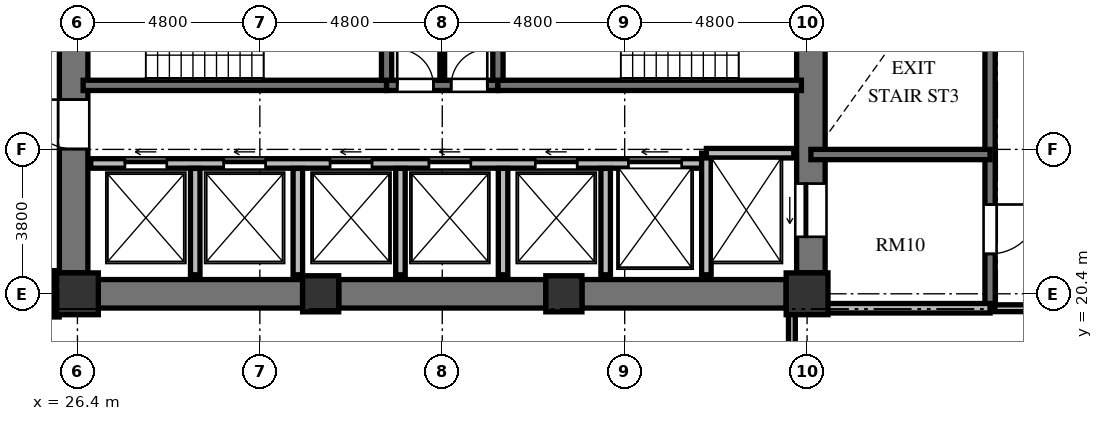
"""IFC4 building model, lengths in metres.
Left out: names, types, materials, properties, quantities, classifications, styles, units other than length and angle.
Written with IfcOpenShell. Run it as: python <this file> out.ifc"""

import sys

from ifc_helpers import new_model, si_unit, direction, frame, frame_2d, origin, origin_2d, place, context, subcontext, project, spatial, rectangle, extrude, element, fill, save


model = new_model("IFC4")
c1 = context("Model", 3, precision=1e-05, world=origin(), true_north=direction((0.0, 1.0)))
c2 = subcontext(c1, "Body", "Model", "MODEL_VIEW")
j1 = project(units=[si_unit("LENGTHUNIT", "METRE"), si_unit("PLANEANGLEUNIT", "RADIAN")], contexts=[c1])
p1 = place(None, origin())
s1 = spatial("IfcSite", under=j1, at=p1, CompositionType="ELEMENT")
p2 = place(p1, origin())
s2 = spatial("IfcBuilding", under=s1, at=p2, CompositionType="ELEMENT")
p3 = place(p2, frame((0.0, 0.0, 114.576)))
s3 = spatial("IfcBuildingStorey", under=s2, at=p3, CompositionType="ELEMENT", Elevation=114.576)
p4 = place(p3, frame((26.4, 20.4, 0.0), z_axis=(0.0, 0.0, 1.0), x_axis=(1.0, 0.0, 0.0)))
e1 = element("IfcColumn", 1, at=p4, inside=s3, PredefinedType="COLUMN", context=c2, shape_type="SweptSolid", body=[
    extrude(rectangle(XDim=1.1, YDim=1.1, at=origin_2d()), origin(), (0.0, 0.0, 1.0), 3.648),
])
for number, where, z_axis, x_axis in (
    (2, (32.8, 20.4, 0.0), (0.0, 0.0, 1.0), (1.0, 0.0, 0.0)),
    (3, (39.2, 20.4, 0.0), (0.0, 0.0, 1.0), (1.0, 0.0, 0.0)),
):
    element("IfcColumn", number, at=place(p3, frame(where, z_axis=z_axis, x_axis=x_axis)), inside=s3, PredefinedType="COLUMN", context=c2, shape_type="SweptSolid", body=[
        extrude(rectangle(XDim=0.95, YDim=0.95, at=origin_2d()), origin(), (0.0, 0.0, 1.0), 3.648),
    ])
p5 = place(p3, frame((45.6, 20.4, 0.0), z_axis=(0.0, 0.0, 1.0), x_axis=(1.0, 0.0, 0.0)))
e4 = element("IfcColumn", 4, at=p5, inside=s3, PredefinedType="COLUMN", context=c2, shape_type="SweptSolid", body=[
    extrude(rectangle(XDim=1.1, YDim=1.1, at=origin_2d()), origin(), (0.0, 0.0, 1.0), 3.648),
])
p6 = place(p3, frame((26.3, 20.95, 0.0), z_axis=(0.0, 0.0, 1.0), x_axis=(0.0, 1.0, 0.0)))
e5 = element("IfcWall", 5, at=p6, inside=s3, PredefinedType="SHEAR", context=c2, shape_type="SweptSolid", body=[
    extrude(rectangle(XDim=14.1, YDim=0.75, at=frame_2d((7.05, 0.0))), origin(), (0.0, 0.0, 1.0), 3.648),
])
p7 = place(p6, frame((6.5, 0.0, 0.0)))
e6 = element("IfcOpeningElement", 6, at=p7, cuts=e5, PredefinedType="OPENING", context=c2, shape_type="SweptSolid", body=[
    extrude(rectangle(XDim=1.2, YDim=2.15, at=frame_2d((0.6, 1.075))), frame((0.0, 0.385, 0.0), z_axis=(0.0, -1.0, 0.0), x_axis=(1.0, 0.0, 0.0)), (0.0, 0.0, 1.0), 0.77),
])
p8 = place(p6, frame((9.6, 0.0, 0.0)))
e7 = element("IfcOpeningElement", 7, at=p8, cuts=e5, PredefinedType="OPENING", context=c2, shape_type="SweptSolid", body=[
    extrude(rectangle(XDim=1.3, YDim=2.2, at=frame_2d((0.65, 1.1))), frame((0.0, 0.385, 0.0), z_axis=(0.0, -1.0, 0.0), x_axis=(1.0, 0.0, 0.0)), (0.0, 0.0, 1.0), 0.77),
])
p9 = place(p6, frame((3.26, 0.0, 0.0)))
e8 = element("IfcOpeningElement", 8, at=p9, cuts=e5, PredefinedType="OPENING", context=c2, shape_type="SweptSolid", body=[
    extrude(rectangle(XDim=1.3, YDim=2.2, at=frame_2d((0.65, 1.1))), frame((0.0, 0.385, 0.0), z_axis=(0.0, -1.0, 0.0), x_axis=(1.0, 0.0, 0.0)), (0.0, 0.0, 1.0), 0.77),
])
p10 = place(p3, frame((45.7, 20.95, 0.0), z_axis=(0.0, 0.0, 1.0), x_axis=(0.0, 1.0, 0.0)))
e9 = element("IfcWall", 9, at=p10, inside=s3, PredefinedType="SHEAR", context=c2, shape_type="SweptSolid", body=[
    extrude(rectangle(XDim=14.1, YDim=0.75, at=frame_2d((7.05, 0.0))), origin(), (0.0, 0.0, 1.0), 3.648),
])
p11 = place(p10, frame((11.75, 0.0, 0.0)))
e10 = element("IfcOpeningElement", 10, at=p11, cuts=e9, PredefinedType="OPENING", context=c2, shape_type="SweptSolid", body=[
    extrude(rectangle(XDim=1.4, YDim=2.3, at=frame_2d((0.7, 1.15))), frame((0.0, 0.385, 0.0), z_axis=(0.0, -1.0, 0.0), x_axis=(1.0, 0.0, 0.0)), (0.0, 0.0, 1.0), 0.77),
])
p12 = place(p10, frame((0.95, 0.0, 0.0)))
e11 = element("IfcOpeningElement", 11, at=p12, cuts=e9, PredefinedType="OPENING", context=c2, shape_type="SweptSolid", body=[
    extrude(rectangle(XDim=1.4, YDim=2.3, at=frame_2d((0.7, 1.15))), frame((0.0, 0.385, 0.0), z_axis=(0.0, -1.0, 0.0), x_axis=(1.0, 0.0, 0.0)), (0.0, 0.0, 1.0), 0.77),
])
p13 = place(p3, frame((26.95, 20.4, 0.0), z_axis=(0.0, 0.0, 1.0), x_axis=(1.0, 0.0, 0.0)))
e12 = element("IfcWall", 12, at=p13, inside=s3, PredefinedType="SHEAR", context=c2, shape_type="SweptSolid", body=[
    extrude(rectangle(XDim=5.375, YDim=0.75, at=frame_2d((2.688, 0.0))), origin(), (0.0, 0.0, 1.0), 3.648),
])
p14 = place(p3, frame((33.275, 20.4, 0.0), z_axis=(0.0, 0.0, 1.0), x_axis=(1.0, 0.0, 0.0)))
e13 = element("IfcWall", 13, at=p14, inside=s3, PredefinedType="SHEAR", context=c2, shape_type="SweptSolid", body=[
    extrude(rectangle(XDim=5.45, YDim=0.75, at=frame_2d((2.725, 0.0))), origin(), (0.0, 0.0, 1.0), 3.648),
])
p15 = place(p3, frame((39.675, 20.4, 0.0), z_axis=(0.0, 0.0, 1.0), x_axis=(1.0, 0.0, 0.0)))
e14 = element("IfcWall", 14, at=p15, inside=s3, PredefinedType="SHEAR", context=c2, shape_type="SweptSolid", body=[
    extrude(rectangle(XDim=5.375, YDim=0.75, at=frame_2d((2.688, 0.0))), origin(), (0.0, 0.0, 1.0), 3.648),
])
p16 = place(p3, frame((26.55, 25.885, 0.0), z_axis=(0.0, 0.0, 1.0), x_axis=(1.0, 0.0, 0.0)))
e15 = element("IfcWall", 15, at=p16, inside=s3, PredefinedType="SHEAR", context=c2, shape_type="SweptSolid", body=[
    extrude(rectangle(XDim=7.985, YDim=0.27, at=frame_2d((3.992, 0.0))), origin(), (0.0, 0.0, 1.0), 3.648),
])
p17 = place(p3, frame((34.535, 25.885, 0.0), z_axis=(0.0, 0.0, 1.0), x_axis=(1.0, 0.0, 0.0)))
e16 = element("IfcWall", 16, at=p17, inside=s3, PredefinedType="SHEAR", context=c2, shape_type="SweptSolid", body=[
    extrude(rectangle(XDim=2.93, YDim=0.27, at=frame_2d((1.465, 0.0))), origin(), (0.0, 0.0, 1.0), 3.648),
])
p18 = place(p17, frame((0.28, 0.0, 0.0)))
e17 = element("IfcOpeningElement", 17, at=p18, cuts=e16, PredefinedType="OPENING", context=c2, shape_type="SweptSolid", body=[
    extrude(rectangle(XDim=0.95, YDim=2.1, at=frame_2d((0.475, 1.05))), frame((0.0, 0.145, 0.0), z_axis=(0.0, -1.0, 0.0), x_axis=(1.0, 0.0, 0.0)), (0.0, 0.0, 1.0), 0.29),
])
p19 = place(p17, frame((1.7, 0.0, 0.0)))
e18 = element("IfcOpeningElement", 18, at=p19, cuts=e16, PredefinedType="OPENING", context=c2, shape_type="SweptSolid", body=[
    extrude(rectangle(XDim=0.95, YDim=2.1, at=frame_2d((0.475, 1.05))), frame((0.0, 0.145, 0.0), z_axis=(0.0, -1.0, 0.0), x_axis=(1.0, 0.0, 0.0)), (0.0, 0.0, 1.0), 0.29),
])
p20 = place(p3, frame((37.465, 25.885, 0.0), z_axis=(0.0, 0.0, 1.0), x_axis=(1.0, 0.0, 0.0)))
e19 = element("IfcWall", 19, at=p20, inside=s3, PredefinedType="SHEAR", context=c2, shape_type="SweptSolid", body=[
    extrude(rectangle(XDim=7.985, YDim=0.27, at=frame_2d((3.992, 0.0))), origin(), (0.0, 0.0, 1.0), 3.648),
])
for number, where, z_axis, x_axis in (
    (20, (34.535, 26.02, 0.0), (0.0, 0.0, 1.0), (0.0, 1.0, 0.0)),
    (21, (37.465, 26.02, 0.0), (0.0, 0.0, 1.0), (0.0, 1.0, 0.0)),
):
    element("IfcWall", number, at=place(p3, frame(where, z_axis=z_axis, x_axis=x_axis)), inside=s3, PredefinedType="SHEAR", context=c2, shape_type="SweptSolid", body=[
        extrude(rectangle(XDim=4.08, YDim=0.27, at=frame_2d((2.04, 0.0))), origin(), (0.0, 0.0, 1.0), 3.648),
    ])
p21 = place(p3, frame((36.0, 26.02, 0.0), z_axis=(0.0, 0.0, 1.0), x_axis=(0.0, 1.0, 0.0)))
e22 = element("IfcWall", 22, at=p21, inside=s3, PredefinedType="PARTITIONING", context=c2, shape_type="SweptSolid", body=[
    extrude(rectangle(XDim=4.08, YDim=0.125, at=frame_2d((2.04, 0.0))), origin(), (0.0, 0.0, 1.0), 3.428),
])
p22 = place(p3, frame((26.75, 23.83, 0.0), z_axis=(0.0, 0.0, 1.0), x_axis=(1.0, 0.0, 0.0)))
e23 = element("IfcWall", 23, at=p22, inside=s3, PredefinedType="SOLIDWALL", context=c2, shape_type="SweptSolid", body=[
    extrude(rectangle(XDim=16.2, YDim=0.25, at=frame_2d((8.1, 0.0))), origin(), (0.0, 0.0, 1.0), 3.428),
])
p23 = place(p22, frame((0.9, 0.0, 0.0)))
e24 = element("IfcOpeningElement", 24, at=p23, cuts=e23, PredefinedType="OPENING", context=c2, shape_type="SweptSolid", body=[
    extrude(rectangle(XDim=1.1, YDim=2.2, at=frame_2d((0.55, 1.1))), frame((0.0, 0.135, 0.0), z_axis=(0.0, -1.0, 0.0), x_axis=(1.0, 0.0, 0.0)), (0.0, 0.0, 1.0), 0.27),
])
p24 = place(p22, frame((3.5, 0.0, 0.0)))
e25 = element("IfcOpeningElement", 25, at=p24, cuts=e23, PredefinedType="OPENING", context=c2, shape_type="SweptSolid", body=[
    extrude(rectangle(XDim=1.1, YDim=2.2, at=frame_2d((0.55, 1.1))), frame((0.0, 0.135, 0.0), z_axis=(0.0, -1.0, 0.0), x_axis=(1.0, 0.0, 0.0)), (0.0, 0.0, 1.0), 0.27),
])
p25 = place(p22, frame((6.3, 0.0, 0.0)))
e26 = element("IfcOpeningElement", 26, at=p25, cuts=e23, PredefinedType="OPENING", context=c2, shape_type="SweptSolid", body=[
    extrude(rectangle(XDim=1.1, YDim=2.2, at=frame_2d((0.55, 1.1))), frame((0.0, 0.135, 0.0), z_axis=(0.0, -1.0, 0.0), x_axis=(1.0, 0.0, 0.0)), (0.0, 0.0, 1.0), 0.27),
])
p26 = place(p22, frame((8.9, 0.0, 0.0)))
e27 = element("IfcOpeningElement", 27, at=p26, cuts=e23, PredefinedType="OPENING", context=c2, shape_type="SweptSolid", body=[
    extrude(rectangle(XDim=1.1, YDim=2.2, at=frame_2d((0.55, 1.1))), frame((0.0, 0.135, 0.0), z_axis=(0.0, -1.0, 0.0), x_axis=(1.0, 0.0, 0.0)), (0.0, 0.0, 1.0), 0.27),
])
p27 = place(p22, frame((11.7, 0.0, 0.0)))
e28 = element("IfcOpeningElement", 28, at=p27, cuts=e23, PredefinedType="OPENING", context=c2, shape_type="SweptSolid", body=[
    extrude(rectangle(XDim=1.1, YDim=2.2, at=frame_2d((0.55, 1.1))), frame((0.0, 0.135, 0.0), z_axis=(0.0, -1.0, 0.0), x_axis=(1.0, 0.0, 0.0)), (0.0, 0.0, 1.0), 0.27),
])
p28 = place(p22, frame((14.15, 0.0, 0.0)))
e29 = element("IfcOpeningElement", 29, at=p28, cuts=e23, PredefinedType="OPENING", context=c2, shape_type="SweptSolid", body=[
    extrude(rectangle(XDim=1.4, YDim=2.3, at=frame_2d((0.7, 1.15))), frame((0.0, 0.135, 0.0), z_axis=(0.0, -1.0, 0.0), x_axis=(1.0, 0.0, 0.0)), (0.0, 0.0, 1.0), 0.27),
])
p29 = place(p3, frame((42.95, 20.9, 0.0), z_axis=(0.0, 0.0, 1.0), x_axis=(0.0, 1.0, 0.0)))
e30 = element("IfcWall", 30, at=p29, inside=s3, PredefinedType="SOLIDWALL", context=c2, shape_type="SweptSolid", body=[
    extrude(rectangle(XDim=3.2, YDim=0.25, at=frame_2d((1.6, 0.0))), origin(), (0.0, 0.0, 1.0), 3.428),
])
p30 = place(p3, frame((42.95, 24.1, 0.0), z_axis=(0.0, 0.0, 1.0), x_axis=(1.0, 0.0, 0.0)))
e31 = element("IfcWall", 31, at=p30, inside=s3, PredefinedType="SOLIDWALL", context=c2, shape_type="SweptSolid", body=[
    extrude(rectangle(XDim=2.3, YDim=0.25, at=frame_2d((1.15, 0.0))), origin(), (0.0, 0.0, 1.0), 3.428),
])
for number, where, z_axis, x_axis in (
    (32, (29.5, 20.9, 0.0), (0.0, 0.0, 1.0), (0.0, 1.0, 0.0)),
    (33, (32.2, 20.9, 0.0), (0.0, 0.0, 1.0), (0.0, 1.0, 0.0)),
    (34, (34.9, 20.9, 0.0), (0.0, 0.0, 1.0), (0.0, 1.0, 0.0)),
    (35, (37.6, 20.9, 0.0), (0.0, 0.0, 1.0), (0.0, 1.0, 0.0)),
    (36, (40.3, 20.9, 0.0), (0.0, 0.0, 1.0), (0.0, 1.0, 0.0)),
):
    element("IfcWall", number, at=place(p3, frame(where, z_axis=z_axis, x_axis=x_axis)), inside=s3, PredefinedType="SOLIDWALL", context=c2, shape_type="SweptSolid", body=[
        extrude(rectangle(XDim=2.8, YDim=0.25, at=frame_2d((1.4, 0.0))), origin(), (0.0, 0.0, 1.0), 3.428),
    ])
p31 = place(p3, frame((50.415, 35.845, 0.0), z_axis=(0.0, 0.0, 1.0), x_axis=(0.0, -1.0, 0.0)))
e37 = element("IfcWall", 37, at=p31, inside=s3, PredefinedType="SHEAR", context=c2, shape_type="SweptSolid", body=[
    extrude(rectangle(XDim=15.825, YDim=0.27, at=frame_2d((7.913, 0.0))), origin(), (0.0, 0.0, 1.0), 3.648),
])
p32 = place(p31, frame((4.445, 0.0, 0.0)))
e38 = element("IfcOpeningElement", 38, at=p32, cuts=e37, PredefinedType="OPENING", context=c2, shape_type="SweptSolid", body=[
    extrude(rectangle(XDim=1.2, YDim=2.15, at=frame_2d((0.6, 1.075))), frame((0.0, 0.145, 0.0), z_axis=(0.0, -1.0, 0.0), x_axis=(1.0, 0.0, 0.0)), (0.0, 0.0, 1.0), 0.29),
])
p33 = place(p31, frame((1.295, 0.0, 0.0)))
e39 = element("IfcOpeningElement", 39, at=p33, cuts=e37, PredefinedType="OPENING", context=c2, shape_type="SweptSolid", body=[
    extrude(rectangle(XDim=1.3, YDim=2.2, at=frame_2d((0.65, 1.1))), frame((0.0, 0.145, 0.0), z_axis=(0.0, -1.0, 0.0), x_axis=(1.0, 0.0, 0.0)), (0.0, 0.0, 1.0), 0.29),
])
p34 = place(p31, frame((13.095, 0.0, 0.0)))
e40 = element("IfcOpeningElement", 40, at=p34, cuts=e37, PredefinedType="OPENING", context=c2, shape_type="SweptSolid", body=[
    extrude(rectangle(XDim=1.3, YDim=2.2, at=frame_2d((0.65, 1.1))), frame((0.0, 0.145, 0.0), z_axis=(0.0, -1.0, 0.0), x_axis=(1.0, 0.0, 0.0)), (0.0, 0.0, 1.0), 0.29),
])
p35 = place(p3, frame((45.7, 24.065, 0.0), z_axis=(0.0, 0.0, 1.0), x_axis=(1.0, 0.0, 0.0)))
e41 = element("IfcWall", 41, at=p35, inside=s3, PredefinedType="SHEAR", context=c2, shape_type="SweptSolid", body=[
    extrude(rectangle(XDim=4.715, YDim=0.27, at=frame_2d((2.357, 0.0))), origin(), (0.0, 0.0, 1.0), 3.648),
])
p36 = place(p3, frame((45.7, 20.02, 0.0), z_axis=(0.0, 0.0, 1.0), x_axis=(1.0, 0.0, 0.0)))
e42 = element("IfcWall", 42, at=p36, inside=s3, PredefinedType="SOLIDWALL", context=c2, shape_type="SweptSolid", body=[
    extrude(rectangle(XDim=4.715, YDim=0.25, at=frame_2d((2.357, 0.0))), origin(), (0.0, 0.0, 1.0), 3.428),
])
p37 = place(p3, frame((53.19, 20.02, 0.0), z_axis=(0.0, 0.0, 1.0), x_axis=(-1.0, 0.0, 0.0)))
e43 = element("IfcWall", 43, at=p37, inside=s3, PredefinedType="PARTITIONING", context=c2, shape_type="SweptSolid", body=[
    extrude(rectangle(XDim=2.65, YDim=0.18, at=frame_2d((1.325, 0.0))), origin(), (0.0, 0.0, 1.0), 3.428),
])
p38 = place(p3, frame((25.83, 21.01, 0.0), z_axis=(0.0, 0.0, 1.0), x_axis=(0.0, -1.0, 0.0)))
e44 = element("IfcWall", 44, at=p38, inside=s3, PredefinedType="PARTITIONING", context=c2, shape_type="SweptSolid", body=[
    extrude(rectangle(XDim=1.22, YDim=0.18, at=frame_2d((0.61, 0.0))), origin(), (0.0, 0.0, 1.0), 3.428),
])
p39 = place(p3, frame((45.2, 19.91, 0.0), z_axis=(0.0, 0.0, 1.0), x_axis=(0.0, -1.0, 0.0)))
e45 = element("IfcWall", 45, at=p39, inside=s3, PredefinedType="PARTITIONING", context=c2, shape_type="SweptSolid", body=[
    extrude(rectangle(XDim=2.55, YDim=0.18, at=frame_2d((1.275, 0.0))), origin(), (0.0, 0.0, 1.0), 3.428),
])
p40 = place(p18, origin())
e46 = element("IfcDoor", 46, at=p40, inside=s3, OperationType="SINGLE_SWING_LEFT", PredefinedType="DOOR", context=c2, shape_type="SweptSolid", body=[
    extrude(rectangle(XDim=0.95, YDim=2.1, at=frame_2d((0.475, 1.05))), frame((0.0, 0.025, 0.0), z_axis=(0.0, -1.0, 0.0), x_axis=(1.0, 0.0, 0.0)), (0.0, 0.0, 1.0), 0.05),
])
fill(e17, e46)
p41 = place(p19, origin())
e47 = element("IfcDoor", 47, at=p41, inside=s3, OperationType="SINGLE_SWING_RIGHT", PredefinedType="DOOR", context=c2, shape_type="SweptSolid", body=[
    extrude(rectangle(XDim=0.95, YDim=2.1, at=frame_2d((0.475, 1.05))), frame((0.0, 0.025, 0.0), z_axis=(0.0, -1.0, 0.0), x_axis=(1.0, 0.0, 0.0)), (0.0, 0.0, 1.0), 0.05),
])
fill(e18, e47)
p42 = place(p9, origin())
e48 = element("IfcDoor", 48, at=p42, inside=s3, OperationType="SINGLE_SWING_RIGHT", PredefinedType="DOOR", context=c2, shape_type="SweptSolid", body=[
    extrude(rectangle(XDim=1.3, YDim=2.2, at=frame_2d((0.65, 1.1))), frame((0.0, 0.025, 0.0), z_axis=(0.0, -1.0, 0.0), x_axis=(1.0, 0.0, 0.0)), (0.0, 0.0, 1.0), 0.05),
])
fill(e8, e48)
p43 = place(p23, origin())
e49 = element("IfcDoor", 49, at=p43, inside=s3, OperationType="SLIDING_TO_LEFT", PredefinedType="DOOR", context=c2, shape_type="SweptSolid", body=[
    extrude(rectangle(XDim=1.1, YDim=2.2, at=frame_2d((0.55, 1.1))), frame((0.0, 0.025, 0.0), z_axis=(0.0, -1.0, 0.0), x_axis=(1.0, 0.0, 0.0)), (0.0, 0.0, 1.0), 0.05),
])
fill(e24, e49)
p44 = place(p24, origin())
e50 = element("IfcDoor", 50, at=p44, inside=s3, OperationType="SLIDING_TO_LEFT", PredefinedType="DOOR", context=c2, shape_type="SweptSolid", body=[
    extrude(rectangle(XDim=1.1, YDim=2.2, at=frame_2d((0.55, 1.1))), frame((0.0, 0.025, 0.0), z_axis=(0.0, -1.0, 0.0), x_axis=(1.0, 0.0, 0.0)), (0.0, 0.0, 1.0), 0.05),
])
fill(e25, e50)
p45 = place(p25, origin())
e51 = element("IfcDoor", 51, at=p45, inside=s3, OperationType="SLIDING_TO_LEFT", PredefinedType="DOOR", context=c2, shape_type="SweptSolid", body=[
    extrude(rectangle(XDim=1.1, YDim=2.2, at=frame_2d((0.55, 1.1))), frame((0.0, 0.025, 0.0), z_axis=(0.0, -1.0, 0.0), x_axis=(1.0, 0.0, 0.0)), (0.0, 0.0, 1.0), 0.05),
])
fill(e26, e51)
p46 = place(p26, origin())
e52 = element("IfcDoor", 52, at=p46, inside=s3, OperationType="SLIDING_TO_LEFT", PredefinedType="DOOR", context=c2, shape_type="SweptSolid", body=[
    extrude(rectangle(XDim=1.1, YDim=2.2, at=frame_2d((0.55, 1.1))), frame((0.0, 0.025, 0.0), z_axis=(0.0, -1.0, 0.0), x_axis=(1.0, 0.0, 0.0)), (0.0, 0.0, 1.0), 0.05),
])
fill(e27, e52)
p47 = place(p27, origin())
e53 = element("IfcDoor", 53, at=p47, inside=s3, OperationType="SLIDING_TO_LEFT", PredefinedType="DOOR", context=c2, shape_type="SweptSolid", body=[
    extrude(rectangle(XDim=1.1, YDim=2.2, at=frame_2d((0.55, 1.1))), frame((0.0, 0.025, 0.0), z_axis=(0.0, -1.0, 0.0), x_axis=(1.0, 0.0, 0.0)), (0.0, 0.0, 1.0), 0.05),
])
fill(e28, e53)
p48 = place(p12, origin())
e54 = element("IfcDoor", 54, at=p48, inside=s3, OperationType="SLIDING_TO_LEFT", PredefinedType="DOOR", context=c2, shape_type="SweptSolid", body=[
    extrude(rectangle(XDim=1.4, YDim=2.3, at=frame_2d((0.7, 1.15))), frame((0.0, 0.025, 0.0), z_axis=(0.0, -1.0, 0.0), x_axis=(1.0, 0.0, 0.0)), (0.0, 0.0, 1.0), 0.05),
])
fill(e11, e54)
p49 = place(p28, origin())
e55 = element("IfcDoor", 55, at=p49, inside=s3, OperationType="SLIDING_TO_LEFT", PredefinedType="DOOR", context=c2, shape_type="SweptSolid", body=[
    extrude(rectangle(XDim=1.4, YDim=2.3, at=frame_2d((0.7, 1.15))), frame((0.0, 0.025, 0.0), z_axis=(0.0, -1.0, 0.0), x_axis=(1.0, 0.0, 0.0)), (0.0, 0.0, 1.0), 0.05),
])
fill(e29, e55)
p50 = place(p34, origin())
e56 = element("IfcDoor", 56, at=p50, inside=s3, OperationType="SINGLE_SWING_LEFT", PredefinedType="DOOR", context=c2, shape_type="SweptSolid", body=[
    extrude(rectangle(XDim=1.3, YDim=2.2, at=frame_2d((0.65, 1.1))), frame((0.0, 0.025, 0.0), z_axis=(0.0, -1.0, 0.0), x_axis=(1.0, 0.0, 0.0)), (0.0, 0.0, 1.0), 0.05),
])
fill(e40, e56)
save(model, sys.argv[1])
